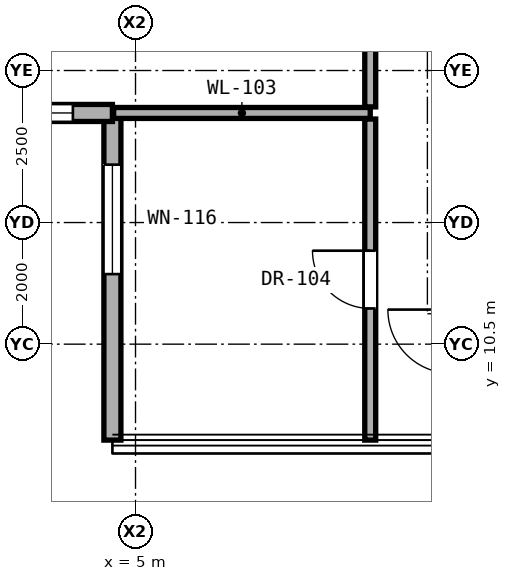
"""IFC4 building model, lengths in metres.
Left out: names, types, materials, properties, quantities, classifications, styles, units other than length and angle.
Written with IfcOpenShell. Run it as: python <this file> out.ifc"""

import sys

from ifc_helpers import new_model, si_unit, direction, frame, frame_2d, origin, place, context, subcontext, project, spatial, rectangle, extrude, element, fill, save


model = new_model("IFC4")
c1 = context("Model", 3, precision=1e-05, world=origin(), true_north=direction((0.0, 1.0)))
c2 = subcontext(c1, "Body", "Model", "MODEL_VIEW")
j1 = project(units=[si_unit("LENGTHUNIT", "METRE"), si_unit("PLANEANGLEUNIT", "RADIAN")], contexts=[c1])
p1 = place(None, origin())
s1 = spatial("IfcSite", under=j1, at=p1, CompositionType="ELEMENT")
p2 = place(p1, origin())
s2 = spatial("IfcBuilding", under=s1, at=p2, CompositionType="ELEMENT")
p3 = place(p2, frame((0.0, 0.0, 25.7)))
s3 = spatial("IfcBuildingStorey", under=s2, at=p3, CompositionType="ELEMENT", Elevation=25.7)
p4 = place(p3, frame((4.62, 14.302, 0.0), z_axis=(0.0, 0.0, 1.0), x_axis=(0.0, -1.0, 0.0)))
e1 = element("IfcWall", 1, at=p4, inside=s3, PredefinedType="SOLIDWALL", context=c2, shape_type="SweptSolid", body=[
    extrude(rectangle(XDim=5.38, YDim=0.28, at=frame_2d((2.69, 0.0))), origin(), (0.0, 0.0, 1.0), 3.04),
])
p5 = place(p4, frame((0.85, 0.0, 0.79)))
e2 = element("IfcOpeningElement", 2, at=p5, cuts=e1, PredefinedType="OPENING", context=c2, shape_type="SweptSolid", body=[
    extrude(rectangle(XDim=1.8, YDim=2.1, at=frame_2d((0.9, 1.05))), frame((0.0, 0.15, 0.0), z_axis=(0.0, -1.0, 0.0), x_axis=(1.0, 0.0, 0.0)), (0.0, 0.0, 1.0), 0.3),
])
p6 = place(p3, frame((-0.76, 14.302, 0.0), z_axis=(0.0, 0.0, 1.0), x_axis=(1.0, 0.0, 0.0)))
e3 = element("IfcWall", 3, at=p6, inside=s3, PredefinedType="SOLIDWALL", context=c2, shape_type="SweptSolid", body=[
    extrude(rectangle(XDim=5.38, YDim=0.28, at=frame_2d((2.69, 0.0))), origin(), (0.0, 0.0, 1.0), 3.04),
])
p7 = place(p6, frame((3.63, 0.0, 0.85)))
e4 = element("IfcOpeningElement", 4, at=p7, cuts=e3, PredefinedType="OPENING", context=c2, shape_type="SweptSolid", body=[
    extrude(rectangle(XDim=1.1, YDim=2.0, at=frame_2d((0.55, 1.0))), frame((0.0, 0.15, 0.0), z_axis=(0.0, -1.0, 0.0), x_axis=(1.0, 0.0, 0.0)), (0.0, 0.0, 1.0), 0.3),
])
p8 = place(p3, frame((4.64, 14.302, 0.0), z_axis=(0.0, 0.0, 1.0), x_axis=(1.0, 0.0, 0.0)))
e5 = element("IfcWall", 5, at=p8, inside=s3, PredefinedType="PARTITIONING", context=c2, shape_type="SweptSolid", body=[
    extrude(rectangle(XDim=4.22, YDim=0.18, at=frame_2d((2.11, 0.0))), origin(), (0.0, 0.0, 1.0), 3.06),
])
p9 = place(p3, frame((8.86, 8.922, 0.0), z_axis=(0.0, 0.0, 1.0), x_axis=(0.0, 1.0, 0.0)))
e6 = element("IfcWall", 6, at=p9, inside=s3, PredefinedType="PARTITIONING", context=c2, shape_type="SweptSolid", body=[
    extrude(rectangle(XDim=5.28, YDim=0.18, at=frame_2d((2.64, 0.0))), origin(), (0.0, 0.0, 1.0), 3.06),
])
p10 = place(p9, frame((2.165, 0.0, 0.0)))
e7 = element("IfcOpeningElement", 7, at=p10, cuts=e6, PredefinedType="OPENING", context=c2, shape_type="SweptSolid", body=[
    extrude(rectangle(XDim=0.95, YDim=2.15, at=frame_2d((0.475, 1.075))), frame((0.0, 0.1, 0.0), z_axis=(0.0, -1.0, 0.0), x_axis=(1.0, 0.0, 0.0)), (0.0, 0.0, 1.0), 0.2),
])
p11 = place(p3, frame((8.86, 14.402, 0.0), z_axis=(0.0, 0.0, 1.0), x_axis=(0.0, 1.0, 0.0)))
e8 = element("IfcWall", 8, at=p11, inside=s3, PredefinedType="PARTITIONING", context=c2, shape_type="SweptSolid", body=[
    extrude(rectangle(XDim=4.667, YDim=0.18, at=frame_2d((2.333, 0.0))), origin(), (0.0, 0.0, 1.0), 2.436),
])
p12 = place(p11, frame((2.408, 0.0, 0.0)))
e9 = element("IfcOpeningElement", 9, at=p12, cuts=e8, PredefinedType="OPENING", context=c2, shape_type="SweptSolid", body=[
    extrude(rectangle(XDim=1.05, YDim=2.2, at=frame_2d((0.525, 1.1))), frame((0.0, 0.1, 0.0), z_axis=(0.0, -1.0, 0.0), x_axis=(1.0, 0.0, 0.0)), (0.0, 0.0, 1.0), 0.2),
])
p13 = place(p5, origin())
e10 = element("IfcWindow", 10, at=p13, inside=s3, PartitioningType="SINGLE_PANEL", PredefinedType="WINDOW", context=c2, shape_type="SweptSolid", body=[
    extrude(rectangle(XDim=1.8, YDim=2.1, at=frame_2d((0.9, 1.05))), frame((0.0, 0.03, 0.0), z_axis=(0.0, -1.0, 0.0), x_axis=(1.0, 0.0, 0.0)), (0.0, 0.0, 1.0), 0.06),
])
fill(e2, e10)
p14 = place(p7, origin())
e11 = element("IfcWindow", 11, at=p14, inside=s3, PartitioningType="SINGLE_PANEL", PredefinedType="WINDOW", context=c2, shape_type="SweptSolid", body=[
    extrude(rectangle(XDim=1.1, YDim=2.0, at=frame_2d((0.55, 1.0))), frame((0.0, 0.03, 0.0), z_axis=(0.0, -1.0, 0.0), x_axis=(1.0, 0.0, 0.0)), (0.0, 0.0, 1.0), 0.06),
])
fill(e4, e11)
p15 = place(p10, origin())
e12 = element("IfcDoor", 12, at=p15, inside=s3, OperationType="SINGLE_SWING_RIGHT", PredefinedType="DOOR", context=c2, shape_type="SweptSolid", body=[
    extrude(rectangle(XDim=0.95, YDim=2.15, at=frame_2d((0.475, 1.075))), frame((0.0, 0.025, 0.0), z_axis=(0.0, -1.0, 0.0), x_axis=(1.0, 0.0, 0.0)), (0.0, 0.0, 1.0), 0.05),
])
fill(e7, e12)
save(model, sys.argv[1])
